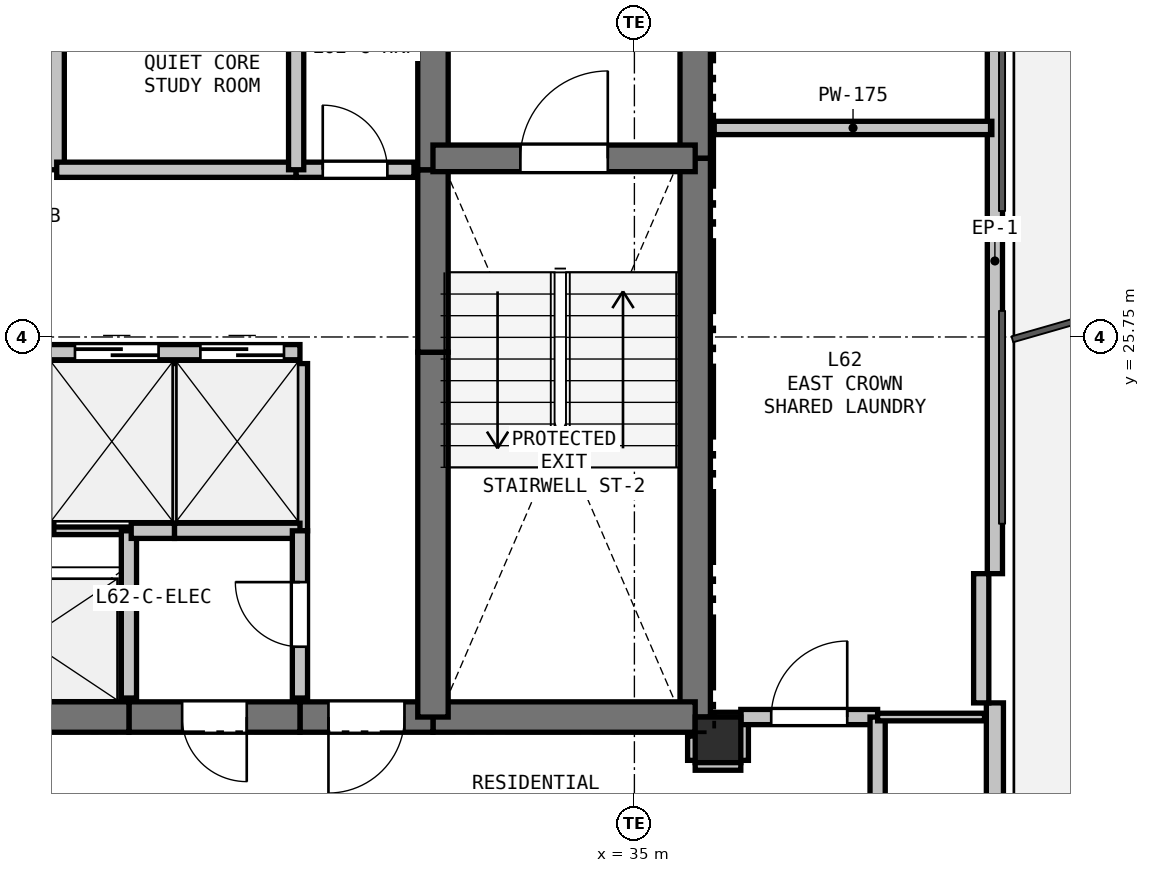
"""IFC4 building model, lengths in metres.
Left out: names, types, materials, properties, quantities, classifications, styles, units other than length and angle.
Written with IfcOpenShell. Run it as: python <this file> out.ifc"""

import sys

from ifc_helpers import new_model, si_unit, direction, frame, frame_2d, origin, origin_2d, place, context, subcontext, project, spatial, rectangle, extrude, element, fill, save


model = new_model("IFC4")
c1 = context("Model", 3, precision=1e-05, world=origin(), true_north=direction((0.0, 1.0)))
c2 = subcontext(c1, "Body", "Model", "MODEL_VIEW")
j1 = project(units=[si_unit("LENGTHUNIT", "METRE"), si_unit("PLANEANGLEUNIT", "RADIAN")], contexts=[c1])
p1 = place(None, origin())
s1 = spatial("IfcSite", under=j1, at=p1, CompositionType="ELEMENT")
p2 = place(p1, origin())
s2 = spatial("IfcBuilding", under=s1, at=p2, CompositionType="ELEMENT")
p3 = place(p2, frame((0.0, 0.0, 223.2)))
s3 = spatial("IfcBuildingStorey", under=s2, at=p3, CompositionType="ELEMENT", Elevation=223.2)
p4 = place(p3, frame((36.1, 20.45, 0.0), z_axis=(0.0, 0.0, 1.0), x_axis=(1.0, 0.0, 0.0)))
e1 = element("IfcColumn", 1, at=p4, inside=s3, PredefinedType="COLUMN", context=c2, shape_type="SweptSolid", body=[
    extrude(rectangle(XDim=0.6, YDim=0.6, at=origin_2d()), origin(), (0.0, 0.0, 1.0), 3.3),
])
p5 = place(p3, frame((39.743, 30.864, 0.0), z_axis=(0.0, 0.0, 1.0), x_axis=(0.0, -1.0, 0.0)))
e2 = element("IfcWall", 2, at=p5, inside=s3, PredefinedType="PARAPET", context=c2, shape_type="SweptSolid", body=[
    extrude(rectangle(XDim=8.228, YDim=0.2, at=frame_2d((4.114, 0.0))), origin(), (0.0, 0.0, 1.0), 0.2),
])
p6 = place(p3, frame((39.743, 20.936, 0.0), z_axis=(0.0, 0.0, 1.0), x_axis=(0.0, -1.0, 0.0)))
e3 = element("IfcWall", 3, at=p6, inside=s3, PredefinedType="SOLIDWALL", context=c2, shape_type="SweptSolid", body=[
    extrude(rectangle(XDim=8.928, YDim=0.225, at=frame_2d((4.464, 0.0))), origin(), (0.0, 0.0, 1.0), 2.7),
])
p7 = place(p6, frame((6.322, 0.0, 0.9)))
e4 = element("IfcOpeningElement", 4, at=p7, cuts=e3, PredefinedType="OPENING", context=c2, shape_type="SweptSolid", body=[
    extrude(rectangle(XDim=1.2, YDim=1.4, at=frame_2d((0.6, 0.7))), frame((0.0, 0.123, 0.0), z_axis=(0.0, -1.0, 0.0), x_axis=(1.0, 0.0, 0.0)), (0.0, 0.0, 1.0), 0.245),
])
p8 = place(p3, frame((39.563, 22.636, 0.0), z_axis=(0.0, 0.0, 1.0), x_axis=(0.0, -1.0, 0.0)))
e5 = element("IfcWall", 5, at=p8, inside=s3, PredefinedType="PARAPET", context=c2, shape_type="SweptSolid", body=[
    extrude(rectangle(XDim=1.7, YDim=0.2, at=frame_2d((0.85, 0.0))), origin(), (0.0, 0.0, 1.0), 2.7),
])
p9 = place(p3, frame((35.8, 32.75, 0.0), z_axis=(0.0, 0.0, 1.0), x_axis=(0.0, -1.0, 0.0)))
e6 = element("IfcWall", 6, at=p9, inside=s3, PredefinedType="SHEAR", context=c2, shape_type="SweptSolid", body=[
    extrude(rectangle(XDim=4.65, YDim=0.4, at=frame_2d((2.325, 0.0))), origin(), (0.0, 0.0, 1.0), 3.08),
])
p10 = place(p3, frame((35.8, 28.1, 0.0), z_axis=(0.0, 0.0, 1.0), x_axis=(0.0, -1.0, 0.0)))
e7 = element("IfcWall", 7, at=p10, inside=s3, PredefinedType="SHEAR", context=c2, shape_type="SweptSolid", body=[
    extrude(rectangle(XDim=7.35, YDim=0.4, at=frame_2d((3.675, 0.0))), origin(), (0.0, 0.0, 1.0), 3.08),
])
p11 = place(p3, frame((35.8, 20.75, 0.0), z_axis=(0.0, 0.0, 1.0), x_axis=(-1.0, 0.0, 0.0)))
e8 = element("IfcWall", 8, at=p11, inside=s3, PredefinedType="SHEAR", context=c2, shape_type="SweptSolid", body=[
    extrude(rectangle(XDim=3.45, YDim=0.4, at=frame_2d((1.725, 0.0))), origin(), (0.0, 0.0, 1.0), 3.08),
])
p12 = place(p3, frame((32.35, 20.75, 0.0), z_axis=(0.0, 0.0, 1.0), x_axis=(-1.0, 0.0, 0.0)))
e9 = element("IfcWall", 9, at=p12, inside=s3, PredefinedType="SHEAR", context=c2, shape_type="SweptSolid", body=[
    extrude(rectangle(XDim=1.75, YDim=0.4, at=frame_2d((0.875, 0.0))), origin(), (0.0, 0.0, 1.0), 3.08),
])
p13 = place(p12, frame((0.375, 0.0, 0.0)))
e10 = element("IfcOpeningElement", 10, at=p13, cuts=e9, PredefinedType="OPENING", context=c2, shape_type="SweptSolid", body=[
    extrude(rectangle(XDim=1.0, YDim=2.15, at=frame_2d((0.5, 1.075))), frame((0.0, 0.21, 0.0), z_axis=(0.0, -1.0, 0.0), x_axis=(1.0, 0.0, 0.0)), (0.0, 0.0, 1.0), 0.42),
])
p14 = place(p3, frame((30.6, 20.75, 0.0), z_axis=(0.0, 0.0, 1.0), x_axis=(-1.0, 0.0, 0.0)))
e11 = element("IfcWall", 11, at=p14, inside=s3, PredefinedType="SHEAR", context=c2, shape_type="SweptSolid", body=[
    extrude(rectangle(XDim=2.25, YDim=0.4, at=frame_2d((1.125, 0.0))), origin(), (0.0, 0.0, 1.0), 3.08),
])
p15 = place(p14, frame((0.7, 0.0, 0.0)))
e12 = element("IfcOpeningElement", 12, at=p15, cuts=e11, PredefinedType="OPENING", context=c2, shape_type="SweptSolid", body=[
    extrude(rectangle(XDim=0.85, YDim=2.1, at=frame_2d((0.425, 1.05))), frame((0.0, 0.21, 0.0), z_axis=(0.0, -1.0, 0.0), x_axis=(1.0, 0.0, 0.0)), (0.0, 0.0, 1.0), 0.42),
])
p16 = place(p3, frame((28.35, 20.75, 0.0), z_axis=(0.0, 0.0, 1.0), x_axis=(-1.0, 0.0, 0.0)))
e13 = element("IfcWall", 13, at=p16, inside=s3, PredefinedType="SHEAR", context=c2, shape_type="SweptSolid", body=[
    extrude(rectangle(XDim=2.7, YDim=0.4, at=frame_2d((1.35, 0.0))), origin(), (0.0, 0.0, 1.0), 3.08),
])
p17 = place(p3, frame((32.35, 20.75, 0.0), z_axis=(0.0, 0.0, 1.0), x_axis=(0.0, 1.0, 0.0)))
e14 = element("IfcWall", 14, at=p17, inside=s3, PredefinedType="SHEAR", context=c2, shape_type="SweptSolid", body=[
    extrude(rectangle(XDim=4.8, YDim=0.4, at=frame_2d((2.4, 0.0))), origin(), (0.0, 0.0, 1.0), 3.08),
])
p18 = place(p3, frame((32.35, 25.55, 0.0), z_axis=(0.0, 0.0, 1.0), x_axis=(0.0, 1.0, 0.0)))
e15 = element("IfcWall", 15, at=p18, inside=s3, PredefinedType="SHEAR", context=c2, shape_type="SweptSolid", body=[
    extrude(rectangle(XDim=2.4, YDim=0.4, at=frame_2d((1.2, 0.0))), origin(), (0.0, 0.0, 1.0), 3.08),
])
p19 = place(p3, frame((32.35, 27.95, 0.0), z_axis=(0.0, 0.0, 1.0), x_axis=(0.0, 1.0, 0.0)))
e16 = element("IfcWall", 16, at=p19, inside=s3, PredefinedType="SHEAR", context=c2, shape_type="SweptSolid", body=[
    extrude(rectangle(XDim=2.8, YDim=0.4, at=frame_2d((1.4, 0.0))), origin(), (0.0, 0.0, 1.0), 3.08),
])
p20 = place(p3, frame((32.35, 28.1, 0.0), z_axis=(0.0, 0.0, 1.0), x_axis=(1.0, 0.0, 0.0)))
e17 = element("IfcWall", 17, at=p20, inside=s3, PredefinedType="SHEAR", context=c2, shape_type="SweptSolid", body=[
    extrude(rectangle(XDim=3.45, YDim=0.35, at=frame_2d((1.725, 0.0))), origin(), (0.0, 0.0, 1.0), 3.08),
])
p21 = place(p20, frame((1.15, 0.0, 0.0)))
e18 = element("IfcOpeningElement", 18, at=p21, cuts=e17, PredefinedType="OPENING", context=c2, shape_type="SweptSolid", body=[
    extrude(rectangle(XDim=1.15, YDim=2.15, at=frame_2d((0.575, 1.075))), frame((0.0, 0.185, 0.0), z_axis=(0.0, -1.0, 0.0), x_axis=(1.0, 0.0, 0.0)), (0.0, 0.0, 1.0), 0.37),
])
p22 = place(p3, frame((25.65, 25.55, 0.0), z_axis=(0.0, 0.0, 1.0), x_axis=(1.0, 0.0, 0.0)))
e19 = element("IfcWall", 19, at=p22, inside=s3, PredefinedType="PARTITIONING", context=c2, shape_type="SweptSolid", body=[
    extrude(rectangle(XDim=4.95, YDim=0.2, at=frame_2d((2.475, 0.0))), origin(), (0.0, 0.0, 1.0), 3.08),
])
p23 = place(p22, frame((0.34, 0.0, 0.0)))
e20 = element("IfcOpeningElement", 20, at=p23, cuts=e19, PredefinedType="OPENING", context=c2, shape_type="SweptSolid", body=[
    extrude(rectangle(XDim=1.1, YDim=2.15, at=frame_2d((0.55, 1.075))), frame((0.0, 0.11, 0.0), z_axis=(0.0, -1.0, 0.0), x_axis=(1.0, 0.0, 0.0)), (0.0, 0.0, 1.0), 0.22),
])
p24 = place(p22, frame((1.99, 0.0, 0.0)))
e21 = element("IfcOpeningElement", 21, at=p24, cuts=e19, PredefinedType="OPENING", context=c2, shape_type="SweptSolid", body=[
    extrude(rectangle(XDim=1.1, YDim=2.15, at=frame_2d((0.55, 1.075))), frame((0.0, 0.11, 0.0), z_axis=(0.0, -1.0, 0.0), x_axis=(1.0, 0.0, 0.0)), (0.0, 0.0, 1.0), 0.22),
])
p25 = place(p22, frame((3.64, 0.0, 0.0)))
e22 = element("IfcOpeningElement", 22, at=p25, cuts=e19, PredefinedType="OPENING", context=c2, shape_type="SweptSolid", body=[
    extrude(rectangle(XDim=1.1, YDim=2.15, at=frame_2d((0.55, 1.075))), frame((0.0, 0.11, 0.0), z_axis=(0.0, -1.0, 0.0), x_axis=(1.0, 0.0, 0.0)), (0.0, 0.0, 1.0), 0.22),
])
p26 = place(p3, frame((27.3, 23.2, 0.0), z_axis=(0.0, 0.0, 1.0), x_axis=(1.0, 0.0, 0.0)))
e23 = element("IfcWall", 23, at=p26, inside=s3, PredefinedType="PARTITIONING", context=c2, shape_type="SweptSolid", body=[
    extrude(rectangle(XDim=1.05, YDim=0.1, at=frame_2d((0.525, 0.0))), origin(), (0.0, 0.0, 1.0), 3.08),
])
p27 = place(p3, frame((28.35, 23.2, 0.0), z_axis=(0.0, 0.0, 1.0), x_axis=(0.0, -1.0, 0.0)))
e24 = element("IfcWall", 24, at=p27, inside=s3, PredefinedType="PARTITIONING", context=c2, shape_type="SweptSolid", body=[
    extrude(rectangle(XDim=2.2, YDim=0.2, at=frame_2d((1.1, 0.0))), origin(), (0.0, 0.0, 1.0), 3.08),
])
p28 = place(p3, frame((27.3, 25.4, 0.0), z_axis=(0.0, 0.0, 1.0), x_axis=(0.0, -1.0, 0.0)))
e25 = element("IfcWall", 25, at=p28, inside=s3, PredefinedType="PARTITIONING", context=c2, shape_type="SweptSolid", body=[
    extrude(rectangle(XDim=2.2, YDim=0.125, at=frame_2d((1.1, 0.0))), origin(), (0.0, 0.0, 1.0), 3.08),
])
p29 = place(p3, frame((28.95, 25.4, 0.0), z_axis=(0.0, 0.0, 1.0), x_axis=(0.0, -1.0, 0.0)))
e26 = element("IfcWall", 26, at=p29, inside=s3, PredefinedType="PARTITIONING", context=c2, shape_type="SweptSolid", body=[
    extrude(rectangle(XDim=2.2, YDim=0.1, at=frame_2d((1.1, 0.0))), origin(), (0.0, 0.0, 1.0), 3.08),
])
p30 = place(p3, frame((28.95, 23.2, 0.0), z_axis=(0.0, 0.0, 1.0), x_axis=(-1.0, 0.0, 0.0)))
e27 = element("IfcWall", 27, at=p30, inside=s3, PredefinedType="PARTITIONING", context=c2, shape_type="SweptSolid", body=[
    extrude(rectangle(XDim=0.57, YDim=0.2, at=frame_2d((0.285, 0.0))), origin(), (0.0, 0.0, 1.0), 3.08),
])
p31 = place(p3, frame((30.6, 25.4, 0.0), z_axis=(0.0, 0.0, 1.0), x_axis=(0.0, -1.0, 0.0)))
e28 = element("IfcWall", 28, at=p31, inside=s3, PredefinedType="PARTITIONING", context=c2, shape_type="SweptSolid", body=[
    extrude(rectangle(XDim=2.2, YDim=0.2, at=frame_2d((1.1, 0.0))), origin(), (0.0, 0.0, 1.0), 3.08),
])
p32 = place(p3, frame((30.6, 23.2, 0.0), z_axis=(0.0, 0.0, 1.0), x_axis=(-1.0, 0.0, 0.0)))
e29 = element("IfcWall", 29, at=p32, inside=s3, PredefinedType="PARTITIONING", context=c2, shape_type="SweptSolid", body=[
    extrude(rectangle(XDim=1.65, YDim=0.2, at=frame_2d((0.825, 0.0))), origin(), (0.0, 0.0, 1.0), 3.08),
])
p33 = place(p3, frame((30.6, 21.0, 0.0), z_axis=(0.0, 0.0, 1.0), x_axis=(0.0, 1.0, 0.0)))
e30 = element("IfcWall", 30, at=p33, inside=s3, PredefinedType="PARTITIONING", context=c2, shape_type="SweptSolid", body=[
    extrude(rectangle(XDim=2.2, YDim=0.2, at=frame_2d((1.1, 0.0))), origin(), (0.0, 0.0, 1.0), 3.08),
])
p34 = place(p33, frame((0.675, 0.0, 0.0)))
e31 = element("IfcOpeningElement", 31, at=p34, cuts=e30, PredefinedType="OPENING", context=c2, shape_type="SweptSolid", body=[
    extrude(rectangle(XDim=0.85, YDim=2.1, at=frame_2d((0.425, 1.05))), frame((0.0, 0.11, 0.0), z_axis=(0.0, -1.0, 0.0), x_axis=(1.0, 0.0, 0.0)), (0.0, 0.0, 1.0), 0.22),
])
p35 = place(p3, frame((27.4, 32.5, 0.0), z_axis=(0.0, 0.0, 1.0), x_axis=(0.0, -1.0, 0.0)))
e32 = element("IfcWall", 32, at=p35, inside=s3, PredefinedType="PARTITIONING", context=c2, shape_type="SweptSolid", body=[
    extrude(rectangle(XDim=4.55, YDim=0.2, at=frame_2d((2.275, 0.0))), origin(), (0.0, 0.0, 1.0), 3.08),
])
p36 = place(p35, frame((1.775, 0.0, 0.0)))
e33 = element("IfcOpeningElement", 33, at=p36, cuts=e32, PredefinedType="OPENING", context=c2, shape_type="SweptSolid", body=[
    extrude(rectangle(XDim=1.0, YDim=2.15, at=frame_2d((0.5, 1.075))), frame((0.0, 0.11, 0.0), z_axis=(0.0, -1.0, 0.0), x_axis=(1.0, 0.0, 0.0)), (0.0, 0.0, 1.0), 0.22),
])
p37 = place(p3, frame((27.4, 27.95, 0.0), z_axis=(0.0, 0.0, 1.0), x_axis=(1.0, 0.0, 0.0)))
e34 = element("IfcWall", 34, at=p37, inside=s3, PredefinedType="PARTITIONING", context=c2, shape_type="SweptSolid", body=[
    extrude(rectangle(XDim=3.15, YDim=0.2, at=frame_2d((1.575, 0.0))), origin(), (0.0, 0.0, 1.0), 3.08),
])
p38 = place(p3, frame((30.55, 27.95, 0.0), z_axis=(0.0, 0.0, 1.0), x_axis=(1.0, 0.0, 0.0)))
e35 = element("IfcWall", 35, at=p38, inside=s3, PredefinedType="PARTITIONING", context=c2, shape_type="SweptSolid", body=[
    extrude(rectangle(XDim=1.55, YDim=0.2, at=frame_2d((0.775, 0.0))), origin(), (0.0, 0.0, 1.0), 3.08),
])
p39 = place(p38, frame((0.35, 0.0, 0.0)))
e36 = element("IfcOpeningElement", 36, at=p39, cuts=e35, PredefinedType="OPENING", context=c2, shape_type="SweptSolid", body=[
    extrude(rectangle(XDim=0.85, YDim=2.1, at=frame_2d((0.425, 1.05))), frame((0.0, 0.11, 0.0), z_axis=(0.0, -1.0, 0.0), x_axis=(1.0, 0.0, 0.0)), (0.0, 0.0, 1.0), 0.22),
])
p40 = place(p3, frame((35.8, 20.15, 0.0), z_axis=(0.0, 0.0, 1.0), x_axis=(1.0, 0.0, 0.0)))
e37 = element("IfcWall", 37, at=p40, inside=s3, PredefinedType="PARTITIONING", context=c2, shape_type="SweptSolid", body=[
    extrude(rectangle(XDim=0.6, YDim=0.2, at=frame_2d((0.3, 0.0))), origin(), (0.0, 0.0, 1.0), 2.528),
])
p41 = place(p3, frame((36.4, 20.18, 0.0), z_axis=(0.0, 0.0, 1.0), x_axis=(0.0, 1.0, 0.0)))
e38 = element("IfcWall", 38, at=p41, inside=s3, PredefinedType="PARTITIONING", context=c2, shape_type="SweptSolid", body=[
    extrude(rectangle(XDim=0.57, YDim=0.2, at=frame_2d((0.285, 0.0))), origin(), (0.0, 0.0, 1.0), 3.08),
])
p42 = place(p3, frame((36.4, 20.75, 0.0), z_axis=(0.0, 0.0, 1.0), x_axis=(1.0, 0.0, 0.0)))
e39 = element("IfcWall", 39, at=p42, inside=s3, PredefinedType="PARTITIONING", context=c2, shape_type="SweptSolid", body=[
    extrude(rectangle(XDim=1.8, YDim=0.2, at=frame_2d((0.9, 0.0))), origin(), (0.0, 0.0, 1.0), 3.08),
])
p43 = place(p42, frame((0.4, 0.0, 0.0)))
e40 = element("IfcOpeningElement", 40, at=p43, cuts=e39, PredefinedType="OPENING", context=c2, shape_type="SweptSolid", body=[
    extrude(rectangle(XDim=1.0, YDim=2.15, at=frame_2d((0.5, 1.075))), frame((0.0, 0.11, 0.0), z_axis=(0.0, -1.0, 0.0), x_axis=(1.0, 0.0, 0.0)), (0.0, 0.0, 1.0), 0.22),
])
p44 = place(p3, frame((38.2, 20.75, 0.0), z_axis=(0.0, 0.0, 1.0), x_axis=(0.0, -1.0, 0.0)))
e41 = element("IfcWall", 41, at=p44, inside=s3, PredefinedType="PARTITIONING", context=c2, shape_type="SweptSolid", body=[
    extrude(rectangle(XDim=2.45, YDim=0.2, at=frame_2d((1.225, 0.0))), origin(), (0.0, 0.0, 1.0), 3.08),
])
p45 = place(p3, frame((35.8, 20.5, 0.0), z_axis=(0.0, 0.0, 1.0), x_axis=(0.0, -1.0, 0.0)))
e42 = element("IfcWall", 42, at=p45, inside=s3, PredefinedType="PARTITIONING", context=c2, shape_type="SweptSolid", body=[
    extrude(rectangle(XDim=0.32, YDim=0.2, at=frame_2d((0.16, 0.0))), origin(), (0.0, 0.0, 1.0), 2.605),
])
p46 = place(p3, frame((39.703, 28.5, 0.0), z_axis=(0.0, 0.0, 1.0), x_axis=(-1.0, 0.0, 0.0)))
e43 = element("IfcWall", 43, at=p46, inside=s3, PredefinedType="PLUMBINGWALL", context=c2, shape_type="SweptSolid", body=[
    extrude(rectangle(XDim=3.653, YDim=0.175, at=frame_2d((1.826, 0.0))), origin(), (0.0, 0.0, 1.0), 2.365),
])
p47 = place(p3, frame((30.55, 30.3, 0.0), z_axis=(0.0, 0.0, 1.0), x_axis=(0.0, -1.0, 0.0)))
e44 = element("IfcWall", 44, at=p47, inside=s3, PredefinedType="PARTITIONING", context=c2, shape_type="SweptSolid", body=[
    extrude(rectangle(XDim=2.35, YDim=0.2, at=frame_2d((1.175, 0.0))), origin(), (0.0, 0.0, 1.0), 3.08),
])
p48 = place(p3, frame((39.606, 20.75, 0.0), z_axis=(0.0, 0.0, 1.0), x_axis=(-1.0, 0.0, 0.0)))
e45 = element("IfcWall", 45, at=p48, inside=s3, PredefinedType="PARTITIONING", context=c2, shape_type="SweptSolid", body=[
    extrude(rectangle(XDim=1.406, YDim=0.1, at=frame_2d((0.703, 0.0))), origin(), (0.0, 0.0, 1.0), 2.365),
])
p49 = place(p3, frame((36.4, 20.75, 0.0), z_axis=(0.0, 0.0, 1.0), x_axis=(-1.0, 0.0, 0.0)))
e46 = element("IfcWall", 46, at=p49, inside=s3, PredefinedType="PARTITIONING", context=c2, shape_type="SweptSolid", body=[
    extrude(rectangle(XDim=0.35, YDim=0.125, at=frame_2d((0.175, 0.0))), origin(), (0.0, 0.0, 1.0), 2.605),
])
p50 = place(p24, origin())
e47 = element("IfcDoor", 47, at=p50, inside=s3, OperationType="SLIDING_TO_LEFT", PredefinedType="DOOR", context=c2, shape_type="SweptSolid", body=[
    extrude(rectangle(XDim=1.1, YDim=2.15, at=frame_2d((0.55, 1.075))), frame((0.0, 0.025, 0.0), z_axis=(0.0, -1.0, 0.0), x_axis=(1.0, 0.0, 0.0)), (0.0, 0.0, 1.0), 0.05),
])
fill(e21, e47)
p51 = place(p25, origin())
e48 = element("IfcDoor", 48, at=p51, inside=s3, OperationType="SLIDING_TO_LEFT", PredefinedType="DOOR", context=c2, shape_type="SweptSolid", body=[
    extrude(rectangle(XDim=1.1, YDim=2.15, at=frame_2d((0.55, 1.075))), frame((0.0, 0.025, 0.0), z_axis=(0.0, -1.0, 0.0), x_axis=(1.0, 0.0, 0.0)), (0.0, 0.0, 1.0), 0.05),
])
fill(e22, e48)
p52 = place(p13, origin())
e49 = element("IfcDoor", 49, at=p52, inside=s3, OperationType="SINGLE_SWING_RIGHT", PredefinedType="DOOR", context=c2, shape_type="SweptSolid", body=[
    extrude(rectangle(XDim=1.0, YDim=2.15, at=frame_2d((0.5, 1.075))), frame((0.0, 0.025, 0.0), z_axis=(0.0, -1.0, 0.0), x_axis=(1.0, 0.0, 0.0)), (0.0, 0.0, 1.0), 0.05),
])
fill(e10, e49)
p53 = place(p21, origin())
e50 = element("IfcDoor", 50, at=p53, inside=s3, OperationType="SINGLE_SWING_RIGHT", PredefinedType="DOOR", context=c2, shape_type="SweptSolid", body=[
    extrude(rectangle(XDim=1.15, YDim=2.15, at=frame_2d((0.575, 1.075))), frame((0.0, 0.025, 0.0), z_axis=(0.0, -1.0, 0.0), x_axis=(1.0, 0.0, 0.0)), (0.0, 0.0, 1.0), 0.05),
])
fill(e18, e50)
p54 = place(p39, origin())
e51 = element("IfcDoor", 51, at=p54, inside=s3, OperationType="SINGLE_SWING_LEFT", PredefinedType="DOOR", context=c2, shape_type="SweptSolid", body=[
    extrude(rectangle(XDim=0.85, YDim=2.1, at=frame_2d((0.425, 1.05))), frame((0.0, 0.025, 0.0), z_axis=(0.0, -1.0, 0.0), x_axis=(1.0, 0.0, 0.0)), (0.0, 0.0, 1.0), 0.05),
])
fill(e36, e51)
p55 = place(p34, origin())
e52 = element("IfcDoor", 52, at=p55, inside=s3, OperationType="SINGLE_SWING_RIGHT", PredefinedType="DOOR", context=c2, shape_type="SweptSolid", body=[
    extrude(rectangle(XDim=0.85, YDim=2.1, at=frame_2d((0.425, 1.05))), frame((0.0, 0.025, 0.0), z_axis=(0.0, -1.0, 0.0), x_axis=(1.0, 0.0, 0.0)), (0.0, 0.0, 1.0), 0.05),
])
fill(e31, e52)
p56 = place(p15, origin())
e53 = element("IfcDoor", 53, at=p56, inside=s3, OperationType="SINGLE_SWING_LEFT", PredefinedType="DOOR", context=c2, shape_type="SweptSolid", body=[
    extrude(rectangle(XDim=0.85, YDim=2.1, at=frame_2d((0.425, 1.05))), frame((0.0, 0.025, 0.0), z_axis=(0.0, -1.0, 0.0), x_axis=(1.0, 0.0, 0.0)), (0.0, 0.0, 1.0), 0.05),
])
fill(e12, e53)
p57 = place(p43, origin())
e54 = element("IfcDoor", 54, at=p57, inside=s3, OperationType="SINGLE_SWING_RIGHT", PredefinedType="DOOR", context=c2, shape_type="SweptSolid", body=[
    extrude(rectangle(XDim=1.0, YDim=2.15, at=frame_2d((0.5, 1.075))), frame((0.0, 0.025, 0.0), z_axis=(0.0, -1.0, 0.0), x_axis=(1.0, 0.0, 0.0)), (0.0, 0.0, 1.0), 0.05),
])
fill(e40, e54)
save(model, sys.argv[1])
